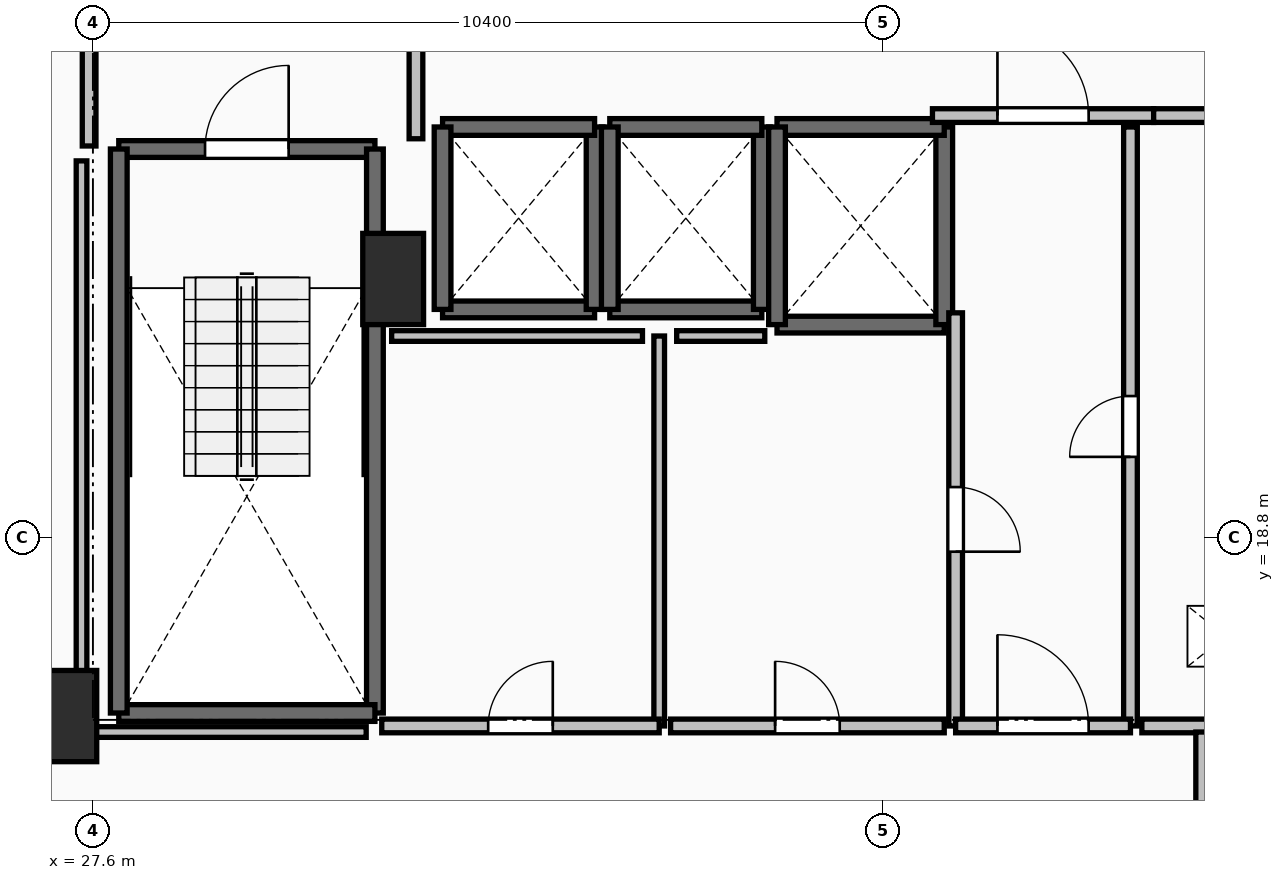
"""IFC4 building model, lengths in metres.
Left out: names, types, materials, properties, quantities, classifications, styles, units other than length and angle.
Written with IfcOpenShell. Run it as: python <this file> out.ifc"""

import sys

from ifc_helpers import new_model, si_unit, direction, frame, frame_2d, origin, origin_2d, place, context, subcontext, project, spatial, rectangle, extrude, element, fill, save


model = new_model("IFC4")
c1 = context("Model", 3, precision=1e-05, world=origin(), true_north=direction((0.0, 1.0)))
c2 = subcontext(c1, "Body", "Model", "MODEL_VIEW")
j1 = project(units=[si_unit("LENGTHUNIT", "METRE"), si_unit("PLANEANGLEUNIT", "RADIAN")], contexts=[c1])
p1 = place(None, origin())
s1 = spatial("IfcSite", under=j1, at=p1, CompositionType="ELEMENT")
p2 = place(p1, origin())
s2 = spatial("IfcBuilding", under=s1, at=p2, CompositionType="ELEMENT")
p3 = place(p2, frame((0.0, 0.0, 27.5)))
s3 = spatial("IfcBuildingStorey", under=s2, at=p3, CompositionType="ELEMENT", Elevation=27.5)
for number, where, z_axis, x_axis in (
    (1, (27.25, 16.45, 0.0), (0.0, 0.0, 1.0), (1.0, 0.0, 0.0)),
    (2, (31.55, 22.2, 0.0), (0.0, 0.0, 1.0), (1.0, 0.0, 0.0)),
):
    element("IfcColumn", number, at=place(p3, frame(where, z_axis=z_axis, x_axis=x_axis)), inside=s3, PredefinedType="PILASTER", context=c2, shape_type="SweptSolid", body=[
        extrude(rectangle(XDim=0.8, YDim=1.2, at=origin_2d()), origin(), (0.0, 0.0, 1.0), 3.5),
    ])
p4 = place(p3, frame((27.94, 23.91, 0.0), z_axis=(0.0, 0.0, 1.0), x_axis=(1.0, 0.0, 0.0)))
e3 = element("IfcWall", 3, at=p4, inside=s3, PredefinedType="SOLIDWALL", context=c2, shape_type="SweptSolid", body=[
    extrude(rectangle(XDim=3.37, YDim=0.22, at=frame_2d((1.685, 0.0))), origin(), (0.0, 0.0, 1.0), 3.24),
])
p5 = place(p4, frame((1.135, 0.0, 0.0)))
e4 = element("IfcOpeningElement", 4, at=p5, cuts=e3, PredefinedType="OPENING", context=c2, shape_type="SweptSolid", body=[
    extrude(rectangle(XDim=1.1, YDim=2.15, at=frame_2d((0.55, 1.075))), frame((0.0, 0.125, 0.0), z_axis=(0.0, -1.0, 0.0), x_axis=(1.0, 0.0, 0.0)), (0.0, 0.0, 1.0), 0.25),
])
p6 = place(p3, frame((31.31, 23.91, 0.0), z_axis=(0.0, 0.0, 1.0), x_axis=(0.0, -1.0, 0.0)))
e5 = element("IfcWall", 5, at=p6, inside=s3, PredefinedType="SOLIDWALL", context=c2, shape_type="SweptSolid", body=[
    extrude(rectangle(XDim=7.42, YDim=0.22, at=frame_2d((3.71, 0.0))), origin(), (0.0, 0.0, 1.0), 3.24),
])
p7 = place(p3, frame((31.31, 16.49, 0.0), z_axis=(0.0, 0.0, 1.0), x_axis=(-1.0, 0.0, 0.0)))
e6 = element("IfcWall", 6, at=p7, inside=s3, PredefinedType="SOLIDWALL", context=c2, shape_type="SweptSolid", body=[
    extrude(rectangle(XDim=3.37, YDim=0.22, at=frame_2d((1.685, 0.0))), origin(), (0.0, 0.0, 1.0), 3.24),
])
p8 = place(p3, frame((27.94, 16.49, 0.0), z_axis=(0.0, 0.0, 1.0), x_axis=(0.0, 1.0, 0.0)))
e7 = element("IfcWall", 7, at=p8, inside=s3, PredefinedType="SOLIDWALL", context=c2, shape_type="SweptSolid", body=[
    extrude(rectangle(XDim=7.42, YDim=0.22, at=frame_2d((3.71, 0.0))), origin(), (0.0, 0.0, 1.0), 3.24),
])
p9 = place(p3, frame((32.2, 21.8, 0.0), z_axis=(0.0, 0.0, 1.0), x_axis=(1.0, 0.0, 0.0)))
e8 = element("IfcWall", 8, at=p9, inside=s3, PredefinedType="SOLIDWALL", context=c2, shape_type="SweptSolid", body=[
    extrude(rectangle(XDim=2.0, YDim=0.22, at=frame_2d((1.0, 0.0))), origin(), (0.0, 0.0, 1.0), 3.24),
])
p10 = place(p3, frame((34.2, 21.8, 0.0), z_axis=(0.0, 0.0, 1.0), x_axis=(0.0, 1.0, 0.0)))
e9 = element("IfcWall", 9, at=p10, inside=s3, PredefinedType="SOLIDWALL", context=c2, shape_type="SweptSolid", body=[
    extrude(rectangle(XDim=2.4, YDim=0.22, at=frame_2d((1.2, 0.0))), origin(), (0.0, 0.0, 1.0), 3.24),
])
p11 = place(p3, frame((34.2, 24.2, 0.0), z_axis=(0.0, 0.0, 1.0), x_axis=(-1.0, 0.0, 0.0)))
e10 = element("IfcWall", 10, at=p11, inside=s3, PredefinedType="SOLIDWALL", context=c2, shape_type="SweptSolid", body=[
    extrude(rectangle(XDim=2.0, YDim=0.22, at=frame_2d((1.0, 0.0))), origin(), (0.0, 0.0, 1.0), 3.24),
])
p12 = place(p3, frame((32.2, 24.2, 0.0), z_axis=(0.0, 0.0, 1.0), x_axis=(0.0, -1.0, 0.0)))
e11 = element("IfcWall", 11, at=p12, inside=s3, PredefinedType="SOLIDWALL", context=c2, shape_type="SweptSolid", body=[
    extrude(rectangle(XDim=2.4, YDim=0.22, at=frame_2d((1.2, 0.0))), origin(), (0.0, 0.0, 1.0), 3.24),
])
p13 = place(p3, frame((34.4, 21.8, 0.0), z_axis=(0.0, 0.0, 1.0), x_axis=(1.0, 0.0, 0.0)))
e12 = element("IfcWall", 12, at=p13, inside=s3, PredefinedType="SOLIDWALL", context=c2, shape_type="SweptSolid", body=[
    extrude(rectangle(XDim=2.0, YDim=0.22, at=frame_2d((1.0, 0.0))), origin(), (0.0, 0.0, 1.0), 3.24),
])
p14 = place(p3, frame((36.4, 21.8, 0.0), z_axis=(0.0, 0.0, 1.0), x_axis=(0.0, 1.0, 0.0)))
e13 = element("IfcWall", 13, at=p14, inside=s3, PredefinedType="SOLIDWALL", context=c2, shape_type="SweptSolid", body=[
    extrude(rectangle(XDim=2.4, YDim=0.22, at=frame_2d((1.2, 0.0))), origin(), (0.0, 0.0, 1.0), 3.24),
])
p15 = place(p3, frame((36.4, 24.2, 0.0), z_axis=(0.0, 0.0, 1.0), x_axis=(-1.0, 0.0, 0.0)))
e14 = element("IfcWall", 14, at=p15, inside=s3, PredefinedType="SOLIDWALL", context=c2, shape_type="SweptSolid", body=[
    extrude(rectangle(XDim=2.0, YDim=0.22, at=frame_2d((1.0, 0.0))), origin(), (0.0, 0.0, 1.0), 3.24),
])
p16 = place(p3, frame((34.4, 24.2, 0.0), z_axis=(0.0, 0.0, 1.0), x_axis=(0.0, -1.0, 0.0)))
e15 = element("IfcWall", 15, at=p16, inside=s3, PredefinedType="SOLIDWALL", context=c2, shape_type="SweptSolid", body=[
    extrude(rectangle(XDim=2.4, YDim=0.22, at=frame_2d((1.2, 0.0))), origin(), (0.0, 0.0, 1.0), 3.24),
])
p17 = place(p3, frame((36.6, 21.6, 0.0), z_axis=(0.0, 0.0, 1.0), x_axis=(1.0, 0.0, 0.0)))
e16 = element("IfcWall", 16, at=p17, inside=s3, PredefinedType="SOLIDWALL", context=c2, shape_type="SweptSolid", body=[
    extrude(rectangle(XDim=2.2, YDim=0.22, at=frame_2d((1.1, 0.0))), origin(), (0.0, 0.0, 1.0), 3.24),
])
p18 = place(p3, frame((38.8, 21.6, 0.0), z_axis=(0.0, 0.0, 1.0), x_axis=(0.0, 1.0, 0.0)))
e17 = element("IfcWall", 17, at=p18, inside=s3, PredefinedType="SOLIDWALL", context=c2, shape_type="SweptSolid", body=[
    extrude(rectangle(XDim=2.6, YDim=0.22, at=frame_2d((1.3, 0.0))), origin(), (0.0, 0.0, 1.0), 3.24),
])
p19 = place(p3, frame((38.8, 24.2, 0.0), z_axis=(0.0, 0.0, 1.0), x_axis=(-1.0, 0.0, 0.0)))
e18 = element("IfcWall", 18, at=p19, inside=s3, PredefinedType="SOLIDWALL", context=c2, shape_type="SweptSolid", body=[
    extrude(rectangle(XDim=2.2, YDim=0.22, at=frame_2d((1.1, 0.0))), origin(), (0.0, 0.0, 1.0), 3.24),
])
p20 = place(p3, frame((36.6, 24.2, 0.0), z_axis=(0.0, 0.0, 1.0), x_axis=(0.0, -1.0, 0.0)))
e19 = element("IfcWall", 19, at=p20, inside=s3, PredefinedType="SOLIDWALL", context=c2, shape_type="SweptSolid", body=[
    extrude(rectangle(XDim=2.6, YDim=0.22, at=frame_2d((1.3, 0.0))), origin(), (0.0, 0.0, 1.0), 3.24),
])
p21 = place(p3, frame((31.85, 24.045, 0.0), z_axis=(0.0, 0.0, 1.0), x_axis=(0.0, 1.0, 0.0)))
e20 = element("IfcWall", 20, at=p21, inside=s3, PredefinedType="PARTITIONING", context=c2, shape_type="SweptSolid", body=[
    extrude(rectangle(XDim=3.91, YDim=0.18, at=frame_2d((1.955, 0.0))), origin(), (0.0, 0.0, 1.0), 3.24),
])
p22 = place(p21, frame((1.355, 0.0, 0.0)))
e21 = element("IfcOpeningElement", 21, at=p22, cuts=e20, PredefinedType="OPENING", context=c2, shape_type="SweptSolid", body=[
    extrude(rectangle(XDim=1.2, YDim=2.15, at=frame_2d((0.6, 1.075))), frame((0.0, 0.105, 0.0), z_axis=(0.0, -1.0, 0.0), x_axis=(1.0, 0.0, 0.0)), (0.0, 0.0, 1.0), 0.21),
])
p23 = place(p3, frame((27.55, 28.0, 0.0), z_axis=(0.0, 0.0, 1.0), x_axis=(0.0, -1.0, 0.0)))
e22 = element("IfcWall", 22, at=p23, inside=s3, PredefinedType="PARTITIONING", context=c2, shape_type="SweptSolid", body=[
    extrude(rectangle(XDim=4.05, YDim=0.18, at=frame_2d((2.025, 0.0))), origin(), (0.0, 0.0, 1.0), 3.24),
])
p24 = place(p23, frame((1.425, 0.0, 0.0)))
e23 = element("IfcOpeningElement", 23, at=p24, cuts=e22, PredefinedType="OPENING", context=c2, shape_type="SweptSolid", body=[
    extrude(rectangle(XDim=1.2, YDim=2.15, at=frame_2d((0.6, 1.075))), frame((0.0, 0.105, 0.0), z_axis=(0.0, -1.0, 0.0), x_axis=(1.0, 0.0, 0.0)), (0.0, 0.0, 1.0), 0.21),
])
p25 = place(p3, frame((38.645, 24.35, 0.0), z_axis=(0.0, 0.0, 1.0), x_axis=(1.0, 0.0, 0.0)))
e24 = element("IfcWall", 24, at=p25, inside=s3, PredefinedType="PARTITIONING", context=c2, shape_type="SweptSolid", body=[
    extrude(rectangle(XDim=2.91, YDim=0.18, at=frame_2d((1.455, 0.0))), origin(), (0.0, 0.0, 1.0), 3.24),
])
p26 = place(p25, frame((0.855, 0.0, 0.0)))
e25 = element("IfcOpeningElement", 25, at=p26, cuts=e24, PredefinedType="OPENING", context=c2, shape_type="SweptSolid", body=[
    extrude(rectangle(XDim=1.2, YDim=2.15, at=frame_2d((0.6, 1.075))), frame((0.0, 0.105, 0.0), z_axis=(0.0, -1.0, 0.0), x_axis=(1.0, 0.0, 0.0)), (0.0, 0.0, 1.0), 0.21),
])
p27 = place(p3, frame((41.555, 24.35, 0.0), z_axis=(0.0, 0.0, 1.0), x_axis=(1.0, 0.0, 0.0)))
e26 = element("IfcWall", 26, at=p27, inside=s3, PredefinedType="PARTITIONING", context=c2, shape_type="SweptSolid", body=[
    extrude(rectangle(XDim=2.445, YDim=0.18, at=frame_2d((1.223, 0.0))), origin(), (0.0, 0.0, 1.0), 3.24),
])
p28 = place(p27, frame((0.823, 0.0, 0.0)))
e27 = element("IfcOpeningElement", 27, at=p28, cuts=e26, PredefinedType="OPENING", context=c2, shape_type="SweptSolid", body=[
    extrude(rectangle(XDim=0.8, YDim=2.05, at=frame_2d((0.4, 1.025))), frame((0.0, 0.105, 0.0), z_axis=(0.0, -1.0, 0.0), x_axis=(1.0, 0.0, 0.0)), (0.0, 0.0, 1.0), 0.21),
])
p29 = place(p3, frame((41.25, 16.32, 0.0), z_axis=(0.0, 0.0, 1.0), x_axis=(0.0, 1.0, 0.0)))
e28 = element("IfcWall", 28, at=p29, inside=s3, PredefinedType="PARTITIONING", context=c2, shape_type="SweptSolid", body=[
    extrude(rectangle(XDim=7.88, YDim=0.18, at=frame_2d((3.94, 0.0))), origin(), (0.0, 0.0, 1.0), 3.24),
])
p30 = place(p29, frame((3.54, 0.0, 0.0)))
e29 = element("IfcOpeningElement", 29, at=p30, cuts=e28, PredefinedType="OPENING", context=c2, shape_type="SweptSolid", body=[
    extrude(rectangle(XDim=0.8, YDim=2.05, at=frame_2d((0.4, 1.025))), frame((0.0, 0.105, 0.0), z_axis=(0.0, -1.0, 0.0), x_axis=(1.0, 0.0, 0.0)), (0.0, 0.0, 1.0), 0.21),
])
p31 = place(p3, frame((38.95, 21.755, 0.0), z_axis=(0.0, 0.0, 1.0), x_axis=(0.0, -1.0, 0.0)))
e30 = element("IfcWall", 30, at=p31, inside=s3, PredefinedType="PARTITIONING", context=c2, shape_type="SweptSolid", body=[
    extrude(rectangle(XDim=5.435, YDim=0.18, at=frame_2d((2.717, 0.0))), origin(), (0.0, 0.0, 1.0), 3.24),
])
p32 = place(p31, frame((2.292, 0.0, 0.0)))
e31 = element("IfcOpeningElement", 31, at=p32, cuts=e30, PredefinedType="OPENING", context=c2, shape_type="SweptSolid", body=[
    extrude(rectangle(XDim=0.85, YDim=2.1, at=frame_2d((0.425, 1.05))), frame((0.0, 0.105, 0.0), z_axis=(0.0, -1.0, 0.0), x_axis=(1.0, 0.0, 0.0)), (0.0, 0.0, 1.0), 0.21),
])
p33 = place(p3, frame((38.95, 16.32, 0.0), z_axis=(0.0, 0.0, 1.0), x_axis=(1.0, 0.0, 0.0)))
e32 = element("IfcWall", 32, at=p33, inside=s3, PredefinedType="PARTITIONING", context=c2, shape_type="SweptSolid", body=[
    extrude(rectangle(XDim=2.3, YDim=0.18, at=frame_2d((1.15, 0.0))), origin(), (0.0, 0.0, 1.0), 3.24),
])
p34 = place(p33, frame((0.55, 0.0, 0.0)))
e33 = element("IfcOpeningElement", 33, at=p34, cuts=e32, PredefinedType="OPENING", context=c2, shape_type="SweptSolid", body=[
    extrude(rectangle(XDim=1.2, YDim=2.15, at=frame_2d((0.6, 1.075))), frame((0.0, 0.105, 0.0), z_axis=(0.0, -1.0, 0.0), x_axis=(1.0, 0.0, 0.0)), (0.0, 0.0, 1.0), 0.21),
])
p35 = place(p3, frame((41.4, 16.32, 0.0), z_axis=(0.0, 0.0, 1.0), x_axis=(1.0, 0.0, 0.0)))
e34 = element("IfcWall", 34, at=p35, inside=s3, PredefinedType="PARTITIONING", context=c2, shape_type="SweptSolid", body=[
    extrude(rectangle(XDim=3.2, YDim=0.18, at=frame_2d((1.6, 0.0))), origin(), (0.0, 0.0, 1.0), 3.24),
])
p36 = place(p35, frame((1.2, 0.0, 0.0)))
e35 = element("IfcOpeningElement", 35, at=p36, cuts=e34, PredefinedType="OPENING", context=c2, shape_type="SweptSolid", body=[
    extrude(rectangle(XDim=0.8, YDim=2.05, at=frame_2d((0.4, 1.025))), frame((0.0, 0.105, 0.0), z_axis=(0.0, -1.0, 0.0), x_axis=(1.0, 0.0, 0.0)), (0.0, 0.0, 1.0), 0.21),
])
p37 = place(p3, frame((35.05, 16.32, 0.0), z_axis=(0.0, 0.0, 1.0), x_axis=(0.0, 1.0, 0.0)))
e36 = element("IfcWall", 36, at=p37, inside=s3, PredefinedType="PARTITIONING", context=c2, shape_type="SweptSolid", body=[
    extrude(rectangle(XDim=5.13, YDim=0.14, at=frame_2d((2.565, 0.0))), origin(), (0.0, 0.0, 1.0), 3.24),
])
p38 = place(p3, frame((31.4, 16.32, 0.0), z_axis=(0.0, 0.0, 1.0), x_axis=(1.0, 0.0, 0.0)))
e37 = element("IfcWall", 37, at=p38, inside=s3, PredefinedType="PARTITIONING", context=c2, shape_type="SweptSolid", body=[
    extrude(rectangle(XDim=3.65, YDim=0.18, at=frame_2d((1.825, 0.0))), origin(), (0.0, 0.0, 1.0), 3.24),
])
p39 = place(p38, frame((1.4, 0.0, 0.0)))
e38 = element("IfcOpeningElement", 38, at=p39, cuts=e37, PredefinedType="OPENING", context=c2, shape_type="SweptSolid", body=[
    extrude(rectangle(XDim=0.85, YDim=2.1, at=frame_2d((0.425, 1.05))), frame((0.0, 0.105, 0.0), z_axis=(0.0, -1.0, 0.0), x_axis=(1.0, 0.0, 0.0)), (0.0, 0.0, 1.0), 0.21),
])
p40 = place(p3, frame((35.2, 16.32, 0.0), z_axis=(0.0, 0.0, 1.0), x_axis=(1.0, 0.0, 0.0)))
e39 = element("IfcWall", 39, at=p40, inside=s3, PredefinedType="PARTITIONING", context=c2, shape_type="SweptSolid", body=[
    extrude(rectangle(XDim=3.6, YDim=0.18, at=frame_2d((1.8, 0.0))), origin(), (0.0, 0.0, 1.0), 3.24),
])
p41 = place(p40, frame((1.375, 0.0, 0.0)))
e40 = element("IfcOpeningElement", 40, at=p41, cuts=e39, PredefinedType="OPENING", context=c2, shape_type="SweptSolid", body=[
    extrude(rectangle(XDim=0.85, YDim=2.1, at=frame_2d((0.425, 1.05))), frame((0.0, 0.105, 0.0), z_axis=(0.0, -1.0, 0.0), x_axis=(1.0, 0.0, 0.0)), (0.0, 0.0, 1.0), 0.21),
])
p42 = place(p3, frame((42.2, 14.157, 0.0), z_axis=(0.0, 0.0, 1.0), x_axis=(0.0, 1.0, 0.0)))
e41 = element("IfcWall", 41, at=p42, inside=s3, PredefinedType="PARTITIONING", context=c2, shape_type="SweptSolid", body=[
    extrude(rectangle(XDim=2.083, YDim=0.18, at=frame_2d((1.042, 0.0))), origin(), (0.0, 0.0, 1.0), 3.24),
])
p43 = place(p3, frame((34.83, 21.45, 0.0), z_axis=(0.0, 0.0, 1.0), x_axis=(-1.0, 0.0, 0.0)))
e42 = element("IfcWall", 42, at=p43, inside=s3, PredefinedType="PARTITIONING", context=c2, shape_type="SweptSolid", body=[
    extrude(rectangle(XDim=3.3, YDim=0.14, at=frame_2d((1.65, 0.0))), origin(), (0.0, 0.0, 1.0), 3.24),
])
p44 = place(p3, frame((36.439, 21.45, 0.0), z_axis=(0.0, 0.0, 1.0), x_axis=(-1.0, 0.0, 0.0)))
e43 = element("IfcWall", 43, at=p44, inside=s3, PredefinedType="PARTITIONING", context=c2, shape_type="SweptSolid", body=[
    extrude(rectangle(XDim=1.159, YDim=0.14, at=frame_2d((0.58, 0.0))), origin(), (0.0, 0.0, 1.0), 3.24),
])
p45 = place(p3, frame((31.195, 16.24, 0.0), z_axis=(0.0, 0.0, 1.0), x_axis=(-1.0, 0.0, 0.0)))
e44 = element("IfcWall", 44, at=p45, inside=s3, PredefinedType="PARTITIONING", context=c2, shape_type="SweptSolid", body=[
    extrude(rectangle(XDim=3.745, YDim=0.14, at=frame_2d((1.873, 0.0))), origin(), (0.0, 0.0, 1.0), 2.432),
])
p46 = place(p3, frame((27.45, 16.24, 0.0), z_axis=(0.0, 0.0, 1.0), x_axis=(0.0, 1.0, 0.0)))
e45 = element("IfcWall", 45, at=p46, inside=s3, PredefinedType="PARTITIONING", context=c2, shape_type="SweptSolid", body=[
    extrude(rectangle(XDim=7.514, YDim=0.14, at=frame_2d((3.757, 0.0))), origin(), (0.0, 0.0, 1.0), 2.432),
])
p47 = place(p5, origin())
e46 = element("IfcDoor", 46, at=p47, inside=s3, OperationType="SINGLE_SWING_RIGHT", PredefinedType="DOOR", context=c2, shape_type="SweptSolid", body=[
    extrude(rectangle(XDim=1.1, YDim=2.15, at=frame_2d((0.55, 1.075))), frame((0.0, 0.025, 0.0), z_axis=(0.0, -1.0, 0.0), x_axis=(1.0, 0.0, 0.0)), (0.0, 0.0, 1.0), 0.05),
])
fill(e4, e46)
p48 = place(p26, origin())
e47 = element("IfcDoor", 47, at=p48, inside=s3, OperationType="SINGLE_SWING_LEFT", PredefinedType="DOOR", context=c2, shape_type="SweptSolid", body=[
    extrude(rectangle(XDim=1.2, YDim=2.15, at=frame_2d((0.6, 1.075))), frame((0.0, 0.025, 0.0), z_axis=(0.0, -1.0, 0.0), x_axis=(1.0, 0.0, 0.0)), (0.0, 0.0, 1.0), 0.05),
])
fill(e25, e47)
p49 = place(p30, origin())
e48 = element("IfcDoor", 48, at=p49, inside=s3, OperationType="SINGLE_SWING_LEFT", PredefinedType="DOOR", context=c2, shape_type="SweptSolid", body=[
    extrude(rectangle(XDim=0.8, YDim=2.05, at=frame_2d((0.4, 1.025))), frame((0.0, 0.025, 0.0), z_axis=(0.0, -1.0, 0.0), x_axis=(1.0, 0.0, 0.0)), (0.0, 0.0, 1.0), 0.05),
])
fill(e29, e48)
p50 = place(p32, origin())
e49 = element("IfcDoor", 49, at=p50, inside=s3, OperationType="SINGLE_SWING_RIGHT", PredefinedType="DOOR", context=c2, shape_type="SweptSolid", body=[
    extrude(rectangle(XDim=0.85, YDim=2.1, at=frame_2d((0.425, 1.05))), frame((0.0, 0.025, 0.0), z_axis=(0.0, -1.0, 0.0), x_axis=(1.0, 0.0, 0.0)), (0.0, 0.0, 1.0), 0.05),
])
fill(e31, e49)
p51 = place(p34, origin())
e50 = element("IfcDoor", 50, at=p51, inside=s3, OperationType="SINGLE_SWING_LEFT", PredefinedType="DOOR", context=c2, shape_type="SweptSolid", body=[
    extrude(rectangle(XDim=1.2, YDim=2.15, at=frame_2d((0.6, 1.075))), frame((0.0, 0.025, 0.0), z_axis=(0.0, -1.0, 0.0), x_axis=(1.0, 0.0, 0.0)), (0.0, 0.0, 1.0), 0.05),
])
fill(e33, e50)
p52 = place(p39, origin())
e51 = element("IfcDoor", 51, at=p52, inside=s3, OperationType="SINGLE_SWING_RIGHT", PredefinedType="DOOR", context=c2, shape_type="SweptSolid", body=[
    extrude(rectangle(XDim=0.85, YDim=2.1, at=frame_2d((0.425, 1.05))), frame((0.0, 0.025, 0.0), z_axis=(0.0, -1.0, 0.0), x_axis=(1.0, 0.0, 0.0)), (0.0, 0.0, 1.0), 0.05),
])
fill(e38, e51)
p53 = place(p41, origin())
e52 = element("IfcDoor", 52, at=p53, inside=s3, OperationType="SINGLE_SWING_LEFT", PredefinedType="DOOR", context=c2, shape_type="SweptSolid", body=[
    extrude(rectangle(XDim=0.85, YDim=2.1, at=frame_2d((0.425, 1.05))), frame((0.0, 0.025, 0.0), z_axis=(0.0, -1.0, 0.0), x_axis=(1.0, 0.0, 0.0)), (0.0, 0.0, 1.0), 0.05),
])
fill(e40, e52)
save(model, sys.argv[1])
